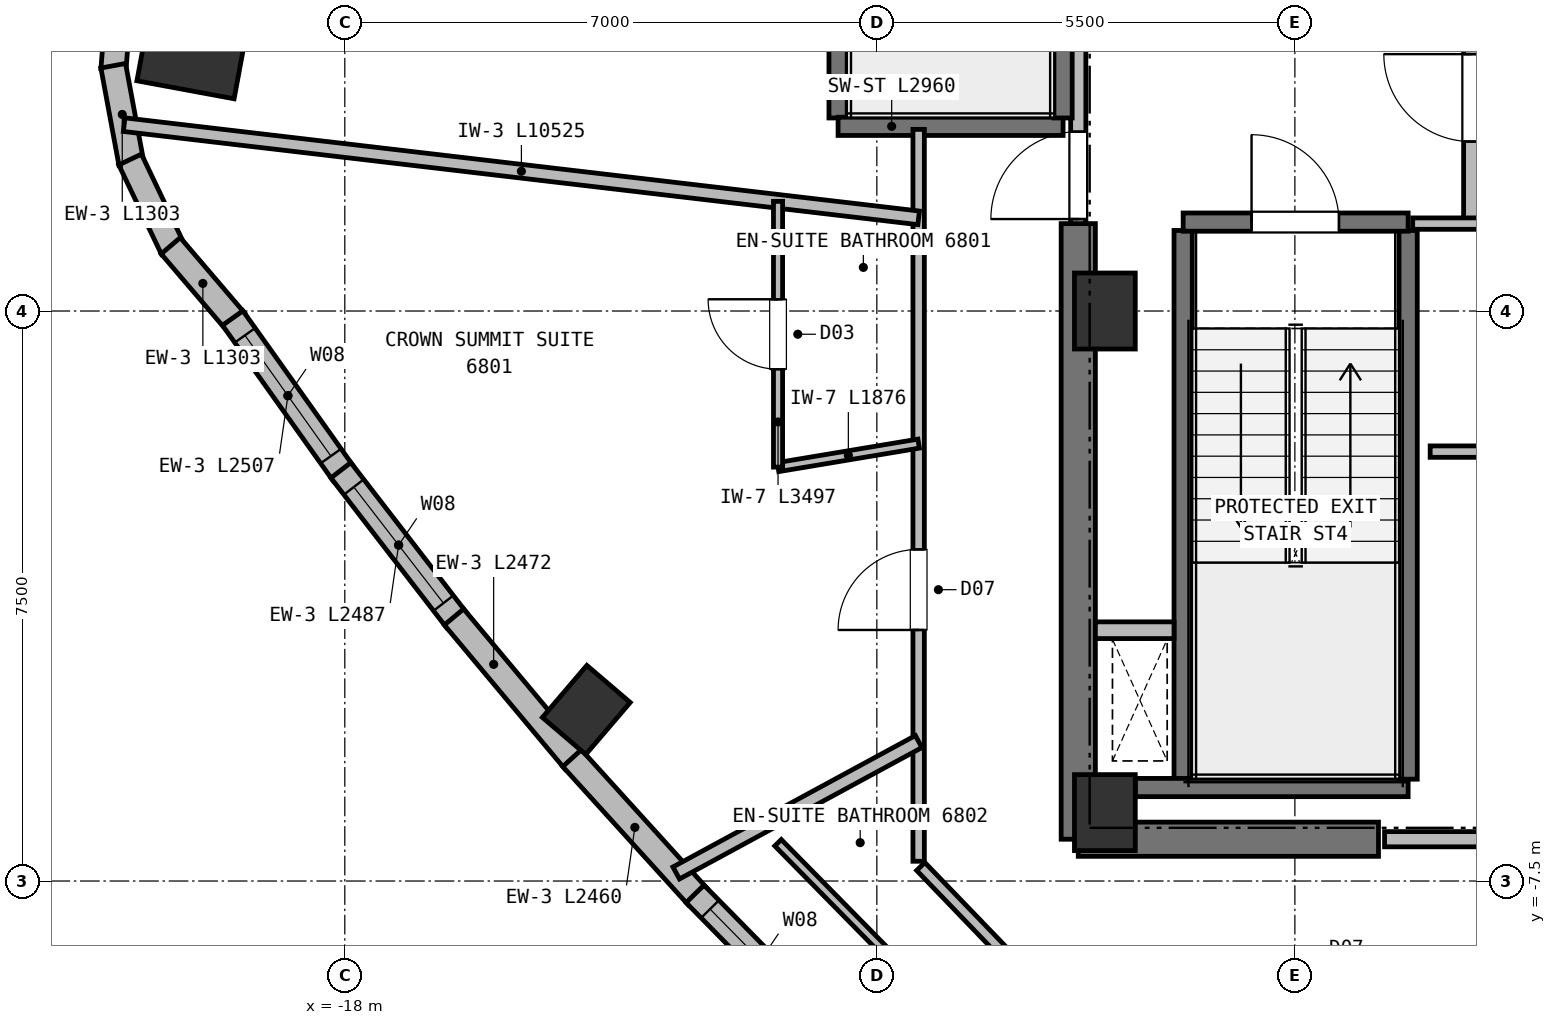
"""IFC4 building model, lengths in metres.
Left out: names, types, materials, properties, quantities, classifications, styles, units other than length and angle.
Written with IfcOpenShell. Run it as: python <this file> out.ifc"""

import sys

from ifc_helpers import new_model, si_unit, direction, frame, frame_2d, origin, origin_2d, place, context, subcontext, project, spatial, rectangle, extrude, element, fill, save


model = new_model("IFC4")
c1 = context("Model", 3, precision=1e-05, world=origin(), true_north=direction((0.0, 1.0)))
c2 = subcontext(c1, "Body", "Model", "MODEL_VIEW")
j1 = project(units=[si_unit("LENGTHUNIT", "METRE"), si_unit("PLANEANGLEUNIT", "RADIAN")], contexts=[c1])
p1 = place(None, origin())
s1 = spatial("IfcSite", under=j1, at=p1, CompositionType="ELEMENT")
p2 = place(p1, origin())
s2 = spatial("IfcBuilding", under=s1, at=p2, CompositionType="ELEMENT")
p3 = place(p2, frame((0.0, 0.0, 260.2)))
s3 = spatial("IfcBuildingStorey", under=s2, at=p3, CompositionType="ELEMENT", Elevation=260.2)
for number, where, z_axis, x_axis in (
    (1, (-8.0, -6.6, 0.0), (0.0, 0.0, 1.0), (1.0, 0.0, 0.0)),
    (2, (-8.0, 0.0, 0.0), (0.0, 0.0, 1.0), (1.0, 0.0, 0.0)),
):
    element("IfcColumn", number, at=place(p3, frame(where, z_axis=z_axis, x_axis=x_axis)), inside=s3, PredefinedType="COLUMN", context=c2, shape_type="SweptSolid", body=[
        extrude(rectangle(XDim=0.8, YDim=1.0, at=origin_2d()), origin(), (0.0, 0.0, 1.0), 4.2),
    ])
p4 = place(p3, frame((-8.35, -6.95, 0.0), z_axis=(0.0, 0.0, 1.0), x_axis=(1.0, 0.0, 0.0)))
e3 = element("IfcWall", 3, at=p4, inside=s3, PredefinedType="SHEAR", context=c2, shape_type="SweptSolid", body=[
    extrude(rectangle(XDim=3.95, YDim=0.45, at=frame_2d((1.975, 0.0))), origin(), (0.0, 0.0, 1.0), 3.95),
])
p5 = place(p3, frame((-8.35, -6.95, 0.0), z_axis=(0.0, 0.0, 1.0), x_axis=(0.0, 1.0, 0.0)))
e4 = element("IfcWall", 4, at=p5, inside=s3, PredefinedType="SHEAR", context=c2, shape_type="SweptSolid", body=[
    extrude(rectangle(XDim=8.1, YDim=0.45, at=frame_2d((4.05, 0.0))), origin(), (0.0, 0.0, 1.0), 3.95),
])
p6 = place(p3, frame((-19.95, 3.698, 0.0), z_axis=(0.0, 0.0, 1.0), x_axis=(-0.983254907564, 0.182235525492, 0.0)))
e5 = element("IfcColumn", 5, at=p6, inside=s3, PredefinedType="COLUMN", context=c2, shape_type="SweptSolid", body=[
    extrude(rectangle(XDim=1.3, YDim=1.6, at=origin_2d()), origin(), (0.0, 0.0, 1.0), 4.2),
])
p7 = place(p3, frame((-14.823, -5.249, 0.0), z_axis=(0.0, 0.0, 1.0), x_axis=(-0.7604059656, 0.64944804833, 0.0)))
e6 = element("IfcColumn", 6, at=p7, inside=s3, PredefinedType="COLUMN", context=c2, shape_type="SweptSolid", body=[
    extrude(rectangle(XDim=0.75, YDim=0.9, at=origin_2d()), origin(), (0.0, 0.0, 1.0), 4.2),
])
p8 = place(p3, frame((-21.044, 3.178, 0.0), z_axis=(0.0, 0.0, 1.0), x_axis=(0.078516255123, 0.996912833542, 0.0)))
e7 = element("IfcWall", 7, at=p8, inside=s3, PredefinedType="SOLIDWALL", context=c2, shape_type="SweptSolid", body=[
    extrude(rectangle(XDim=1.303, YDim=0.33, at=frame_2d((0.651, 0.0))), origin(), (0.0, 0.0, 1.0), 3.95),
])
for number, where, z_axis, x_axis in (
    (8, (-20.809, 1.946, 0.0), (0.0, 0.0, 1.0), (-0.182, 0.983, 0.0)),
    (9, (-20.263, 0.817, 0.0), (0.0, 0.0, 1.0), (-0.431, 0.903, 0.0)),
):
    element("IfcWall", number, at=place(p3, frame(where, z_axis=z_axis, x_axis=x_axis)), inside=s3, PredefinedType="SOLIDWALL", context=c2, shape_type="SweptSolid", body=[
        extrude(rectangle(XDim=1.303, YDim=0.33, at=frame_2d((0.652, 0.0))), origin(), (0.0, 0.0, 1.0), 3.95),
    ])
p9 = place(p3, frame((-19.444, -0.132, 0.0), z_axis=(0.0, 0.0, 1.0), x_axis=(-0.649463279453, 0.760392956728, 0.0)))
e10 = element("IfcWall", 10, at=p9, inside=s3, PredefinedType="SOLIDWALL", context=c2, shape_type="SweptSolid", body=[
    extrude(rectangle(XDim=1.303, YDim=0.33, at=frame_2d((0.651, 0.0))), origin(), (0.0, 0.0, 1.0), 3.95),
])
p10 = place(p3, frame((-18.022, -2.135, 0.0), z_axis=(0.0, 0.0, 1.0), x_axis=(-0.579707768808, 0.814824461331, 0.0)))
e11 = element("IfcWall", 11, at=p10, inside=s3, PredefinedType="SOLIDWALL", context=c2, shape_type="SweptSolid", body=[
    extrude(rectangle(XDim=2.507, YDim=0.33, at=frame_2d((1.253, 0.0))), origin(), (0.0, 0.0, 1.0), 3.95),
])
p11 = place(p10, frame((0.278, 0.0, 0.72)))
e12 = element("IfcOpeningElement", 12, at=p11, cuts=e11, PredefinedType="OPENING", context=c2, shape_type="SweptSolid", body=[
    extrude(rectangle(XDim=1.95, YDim=2.1, at=frame_2d((0.975, 1.05))), frame((0.0, 0.175, 0.0), z_axis=(0.0, -1.0, 0.0), x_axis=(1.0, 0.0, 0.0)), (0.0, 0.0, 1.0), 0.35),
])
p12 = place(p3, frame((-16.532, -4.064, 0.0), z_axis=(0.0, 0.0, 1.0), x_axis=(-0.610966936387, 0.791656113879, 0.0)))
e13 = element("IfcWall", 13, at=p12, inside=s3, PredefinedType="SOLIDWALL", context=c2, shape_type="SweptSolid", body=[
    extrude(rectangle(XDim=2.488, YDim=0.33, at=frame_2d((1.244, 0.0))), origin(), (0.0, 0.0, 1.0), 3.95),
])
p13 = place(p12, frame((0.279, 0.0, 0.72)))
e14 = element("IfcOpeningElement", 14, at=p13, cuts=e13, PredefinedType="OPENING", context=c2, shape_type="SweptSolid", body=[
    extrude(rectangle(XDim=1.93, YDim=2.1, at=frame_2d((0.965, 1.05))), frame((0.0, 0.175, 0.0), z_axis=(0.0, -1.0, 0.0), x_axis=(1.0, 0.0, 0.0)), (0.0, 0.0, 1.0), 0.35),
])
p14 = place(p3, frame((-14.977, -5.921, 0.0), z_axis=(0.0, 0.0, 1.0), x_axis=(-0.641757017805, 0.76690803236, 0.0)))
e15 = element("IfcWall", 15, at=p14, inside=s3, PredefinedType="SOLIDWALL", context=c2, shape_type="SweptSolid", body=[
    extrude(rectangle(XDim=2.472, YDim=0.33, at=frame_2d((1.236, 0.0))), origin(), (0.0, 0.0, 1.0), 3.95),
])
p15 = place(p3, frame((-13.357, -7.705, 0.0), z_axis=(0.0, 0.0, 1.0), x_axis=(-0.671827602416, 0.740707548653, 0.0)))
e16 = element("IfcWall", 16, at=p15, inside=s3, PredefinedType="SOLIDWALL", context=c2, shape_type="SweptSolid", body=[
    extrude(rectangle(XDim=2.46, YDim=0.33, at=frame_2d((1.23, 0.0))), origin(), (0.0, 0.0, 1.0), 3.95),
])
p16 = place(p3, frame((-11.672, -9.417, 0.0), z_axis=(0.0, 0.0, 1.0), x_axis=(-0.701107893647, 0.713055202257, 0.0)))
e17 = element("IfcWall", 17, at=p16, inside=s3, PredefinedType="SOLIDWALL", context=c2, shape_type="SweptSolid", body=[
    extrude(rectangle(XDim=2.452, YDim=0.33, at=frame_2d((1.226, 0.0))), origin(), (0.0, 0.0, 1.0), 3.95),
])
p17 = place(p16, frame((0.281, 0.0, 0.72)))
e18 = element("IfcOpeningElement", 18, at=p17, cuts=e17, PredefinedType="OPENING", context=c2, shape_type="SweptSolid", body=[
    extrude(rectangle(XDim=1.89, YDim=2.1, at=frame_2d((0.945, 1.05))), frame((0.0, 0.175, 0.0), z_axis=(0.0, -1.0, 0.0), x_axis=(1.0, 0.0, 0.0)), (0.0, 0.0, 1.0), 0.35),
])
p18 = place(p3, frame((-6.97, -6.16, 0.0), z_axis=(0.0, 0.0, 1.0), x_axis=(0.0, 1.0, 0.0)))
e19 = element("IfcWall", 19, at=p18, inside=s3, PredefinedType="SHEAR", context=c2, shape_type="SweptSolid", body=[
    extrude(rectangle(XDim=7.22, YDim=0.24, at=frame_2d((3.61, 0.0))), origin(), (0.0, 0.0, 1.0), 3.95),
])
p19 = place(p3, frame((-7.6, -6.27, 0.0), z_axis=(0.0, 0.0, 1.0), x_axis=(1.0, 0.0, 0.0)))
e20 = element("IfcWall", 20, at=p19, inside=s3, PredefinedType="SHEAR", context=c2, shape_type="SweptSolid", body=[
    extrude(rectangle(XDim=3.59, YDim=0.24, at=frame_2d((1.795, 0.0))), origin(), (0.0, 0.0, 1.0), 3.95),
])
p20 = place(p3, frame((-4.01, -6.16, 0.0), z_axis=(0.0, 0.0, 1.0), x_axis=(0.0, 1.0, 0.0)))
e21 = element("IfcWall", 21, at=p20, inside=s3, PredefinedType="SHEAR", context=c2, shape_type="SweptSolid", body=[
    extrude(rectangle(XDim=7.22, YDim=0.24, at=frame_2d((3.61, 0.0))), origin(), (0.0, 0.0, 1.0), 3.95),
])
p21 = place(p3, frame((-6.97, 1.17, 0.0), z_axis=(0.0, 0.0, 1.0), x_axis=(1.0, 0.0, 0.0)))
e22 = element("IfcWall", 22, at=p21, inside=s3, PredefinedType="SHEAR", context=c2, shape_type="SweptSolid", body=[
    extrude(rectangle(XDim=2.96, YDim=0.24, at=frame_2d((1.48, 0.0))), origin(), (0.0, 0.0, 1.0), 3.95),
])
p22 = place(p21, frame((0.9, 0.0, 0.0)))
e23 = element("IfcOpeningElement", 23, at=p22, cuts=e22, PredefinedType="OPENING", context=c2, shape_type="SweptSolid", body=[
    extrude(rectangle(XDim=1.15, YDim=2.15, at=frame_2d((0.575, 1.075))), frame((0.0, 0.13, 0.0), z_axis=(0.0, -1.0, 0.0), x_axis=(1.0, 0.0, 0.0)), (0.0, 0.0, 1.0), 0.26),
])
p23 = place(p3, frame((-8.125, -4.2, 0.0), z_axis=(0.0, 0.0, 1.0), x_axis=(1.0, 0.0, 0.0)))
e24 = element("IfcWall", 24, at=p23, inside=s3, PredefinedType="PARTITIONING", context=c2, shape_type="SweptSolid", body=[
    extrude(rectangle(XDim=1.035, YDim=0.22, at=frame_2d((0.518, 0.0))), origin(), (0.0, 0.0, 1.0), 3.95),
])
p24 = place(p3, frame((-3.18, 1.15, 0.0), z_axis=(0.0, 0.0, 1.0), x_axis=(0.0, 1.0, 0.0)))
e25 = element("IfcWall", 25, at=p24, inside=s3, PredefinedType="PARTITIONING", context=c2, shape_type="SweptSolid", body=[
    extrude(rectangle(XDim=3.3, YDim=0.2, at=frame_2d((1.65, 0.0))), origin(), (0.0, 0.0, 1.0), 3.95),
])
p25 = place(p24, frame((1.08, 0.0, 0.0)))
e26 = element("IfcOpeningElement", 26, at=p25, cuts=e25, PredefinedType="OPENING", context=c2, shape_type="SweptSolid", body=[
    extrude(rectangle(XDim=1.15, YDim=2.15, at=frame_2d((0.575, 1.075))), frame((0.0, 0.11, 0.0), z_axis=(0.0, -1.0, 0.0), x_axis=(1.0, 0.0, 0.0)), (0.0, 0.0, 1.0), 0.22),
])
p26 = place(p3, frame((-8.35, 1.15, 0.0), z_axis=(0.0, 0.0, 1.0), x_axis=(0.0, 1.0, 0.0)))
e27 = element("IfcWall", 27, at=p26, inside=s3, PredefinedType="PARTITIONING", context=c2, shape_type="SweptSolid", body=[
    extrude(rectangle(XDim=5.4, YDim=0.2, at=frame_2d((2.7, 0.0))), origin(), (0.0, 0.0, 1.0), 3.95),
])
p27 = place(p26, frame((0.06, 0.0, 0.0)))
e28 = element("IfcOpeningElement", 28, at=p27, cuts=e27, PredefinedType="OPENING", context=c2, shape_type="SweptSolid", body=[
    extrude(rectangle(XDim=1.15, YDim=2.15, at=frame_2d((0.575, 1.075))), frame((0.0, 0.11, 0.0), z_axis=(0.0, -1.0, 0.0), x_axis=(1.0, 0.0, 0.0)), (0.0, 0.0, 1.0), 0.22),
])
p28 = place(p3, frame((3.95, 1.15, 0.0), z_axis=(0.0, 0.0, 1.0), x_axis=(-1.0, 0.0, 0.0)))
e29 = element("IfcWall", 29, at=p28, inside=s3, PredefinedType="PARTITIONING", context=c2, shape_type="SweptSolid", body=[
    extrude(rectangle(XDim=7.9, YDim=0.15, at=frame_2d((3.95, 0.0))), origin(), (0.0, 0.0, 1.0), 3.95),
])
p29 = place(p28, frame((5.34, 0.0, 0.0)))
e30 = element("IfcOpeningElement", 30, at=p29, cuts=e29, PredefinedType="OPENING", context=c2, shape_type="SweptSolid", body=[
    extrude(rectangle(XDim=0.92, YDim=2.05, at=frame_2d((0.46, 1.025))), frame((0.0, 0.085, 0.0), z_axis=(0.0, -1.0, 0.0), x_axis=(1.0, 0.0, 0.0)), (0.0, 0.0, 1.0), 0.17),
])
p30 = place(p28, frame((1.84, 0.0, 0.0)))
e31 = element("IfcOpeningElement", 31, at=p30, cuts=e29, PredefinedType="OPENING", context=c2, shape_type="SweptSolid", body=[
    extrude(rectangle(XDim=0.92, YDim=2.05, at=frame_2d((0.46, 1.025))), frame((0.0, 0.085, 0.0), z_axis=(0.0, -1.0, 0.0), x_axis=(1.0, 0.0, 0.0)), (0.0, 0.0, 1.0), 0.17),
])
p31 = place(p3, frame((-4.32, -6.95, 0.0), z_axis=(0.0, 0.0, 1.0), x_axis=(1.0, 0.0, 0.0)))
e32 = element("IfcWall", 32, at=p31, inside=s3, PredefinedType="PARTITIONING", context=c2, shape_type="SweptSolid", body=[
    extrude(rectangle(XDim=8.64, YDim=0.2, at=frame_2d((4.32, 0.0))), origin(), (0.0, 0.0, 1.0), 3.95),
])
p32 = place(p3, frame((-3.72, -1.85, 0.0), z_axis=(0.0, 0.0, 1.0), x_axis=(1.0, 0.0, 0.0)))
e33 = element("IfcWall", 33, at=p32, inside=s3, PredefinedType="PARTITIONING", context=c2, shape_type="SweptSolid", body=[
    extrude(rectangle(XDim=7.44, YDim=0.15, at=frame_2d((3.72, 0.0))), origin(), (0.0, 0.0, 1.0), 3.95),
])
p33 = place(p32, frame((1.21, 0.0, 0.0)))
e34 = element("IfcOpeningElement", 34, at=p33, cuts=e33, PredefinedType="OPENING", context=c2, shape_type="SweptSolid", body=[
    extrude(rectangle(XDim=0.92, YDim=2.05, at=frame_2d((0.46, 1.025))), frame((0.0, 0.085, 0.0), z_axis=(0.0, -1.0, 0.0), x_axis=(1.0, 0.0, 0.0)), (0.0, 0.0, 1.0), 0.17),
])
p34 = place(p32, frame((4.91, 0.0, 0.0)))
e35 = element("IfcOpeningElement", 35, at=p34, cuts=e33, PredefinedType="OPENING", context=c2, shape_type="SweptSolid", body=[
    extrude(rectangle(XDim=0.92, YDim=2.05, at=frame_2d((0.46, 1.025))), frame((0.0, 0.085, 0.0), z_axis=(0.0, -1.0, 0.0), x_axis=(1.0, 0.0, 0.0)), (0.0, 0.0, 1.0), 0.17),
])
p35 = place(p3, frame((-11.51, 2.54, 0.0), z_axis=(0.0, 0.0, 1.0), x_axis=(0.0, 1.0, 0.0)))
e36 = element("IfcWall", 36, at=p35, inside=s3, PredefinedType="SHEAR", context=c2, shape_type="SweptSolid", body=[
    extrude(rectangle(XDim=6.42, YDim=0.24, at=frame_2d((3.21, 0.0))), origin(), (0.0, 0.0, 1.0), 3.95),
])
p36 = place(p3, frame((-11.51, 2.43, 0.0), z_axis=(0.0, 0.0, 1.0), x_axis=(1.0, 0.0, 0.0)))
e37 = element("IfcWall", 37, at=p36, inside=s3, PredefinedType="SHEAR", context=c2, shape_type="SweptSolid", body=[
    extrude(rectangle(XDim=2.96, YDim=0.24, at=frame_2d((1.48, 0.0))), origin(), (0.0, 0.0, 1.0), 3.95),
])
p37 = place(p3, frame((-8.55, 2.54, 0.0), z_axis=(0.0, 0.0, 1.0), x_axis=(0.0, 1.0, 0.0)))
e38 = element("IfcWall", 38, at=p37, inside=s3, PredefinedType="SHEAR", context=c2, shape_type="SweptSolid", body=[
    extrude(rectangle(XDim=6.42, YDim=0.24, at=frame_2d((3.21, 0.0))), origin(), (0.0, 0.0, 1.0), 3.95),
])
p38 = place(p3, frame((-10.45, -7.24, 0.0), z_axis=(0.0, 0.0, 1.0), x_axis=(0.0, 1.0, 0.0)))
e39 = element("IfcWall", 39, at=p38, inside=s3, PredefinedType="PARTITIONING", context=c2, shape_type="SweptSolid", body=[
    extrude(rectangle(XDim=9.63, YDim=0.15, at=frame_2d((4.815, 0.0))), origin(), (0.0, 0.0, 1.0), 3.95),
])
p39 = place(p38, frame((3.043, 0.0, 0.0)))
e40 = element("IfcOpeningElement", 40, at=p39, cuts=e39, PredefinedType="OPENING", context=c2, shape_type="SweptSolid", body=[
    extrude(rectangle(XDim=1.06, YDim=2.15, at=frame_2d((0.53, 1.075))), frame((0.0, 0.085, 0.0), z_axis=(0.0, -1.0, 0.0), x_axis=(1.0, 0.0, 0.0)), (0.0, 0.0, 1.0), 0.17),
])
p40 = place(p3, frame((-8.648, -9.151, 0.0), z_axis=(0.0, 0.0, 1.0), x_axis=(-0.693764562202, 0.720201869085, 0.0)))
e41 = element("IfcWall", 41, at=p40, inside=s3, PredefinedType="PARTITIONING", context=c2, shape_type="SweptSolid", body=[
    extrude(rectangle(XDim=2.558, YDim=0.15, at=frame_2d((1.279, 0.0))), origin(), (0.0, 0.0, 1.0), 3.95),
])
p41 = place(p3, frame((-10.45, 1.226, 0.0), z_axis=(0.0, 0.0, 1.0), x_axis=(-0.993188711069, 0.116516883775, 0.0)))
e42 = element("IfcWall", 42, at=p41, inside=s3, PredefinedType="PARTITIONING", context=c2, shape_type="SweptSolid", body=[
    extrude(rectangle(XDim=10.525, YDim=0.18, at=frame_2d((5.262, 0.0))), origin(), (0.0, 0.0, 1.0), 3.95),
])
p42 = place(p3, frame((-12.3, -2.054, 0.0), z_axis=(0.0, 0.0, 1.0), x_axis=(0.986351677294, 0.164652266004, 0.0)))
e43 = element("IfcWall", 43, at=p42, inside=s3, PredefinedType="PARTITIONING", context=c2, shape_type="SweptSolid", body=[
    extrude(rectangle(XDim=1.876, YDim=0.12, at=frame_2d((0.938, 0.0))), origin(), (0.0, 0.0, 1.0), 3.95),
])
p43 = place(p3, frame((-12.3, -2.054, 0.0), z_axis=(0.0, 0.0, 1.0), x_axis=(0.0, 1.0, 0.0)))
e44 = element("IfcWall", 44, at=p43, inside=s3, PredefinedType="PARTITIONING", context=c2, shape_type="SweptSolid", body=[
    extrude(rectangle(XDim=3.497, YDim=0.12, at=frame_2d((1.749, 0.0))), origin(), (0.0, 0.0, 1.0), 3.95),
])
p44 = place(p43, frame((1.288, 0.0, 0.0)))
e45 = element("IfcOpeningElement", 45, at=p44, cuts=e44, PredefinedType="OPENING", context=c2, shape_type="SweptSolid", body=[
    extrude(rectangle(XDim=0.92, YDim=2.1, at=frame_2d((0.46, 1.05))), frame((0.0, 0.07, 0.0), z_axis=(0.0, -1.0, 0.0), x_axis=(1.0, 0.0, 0.0)), (0.0, 0.0, 1.0), 0.14),
])
p45 = place(p3, frame((-10.45, -5.665, 0.0), z_axis=(0.0, 0.0, 1.0), x_axis=(-0.87913221744, -0.476577951922, 0.0)))
e46 = element("IfcWall", 46, at=p45, inside=s3, PredefinedType="PARTITIONING", context=c2, shape_type="SweptSolid", body=[
    extrude(rectangle(XDim=3.628, YDim=0.18, at=frame_2d((1.814, 0.0))), origin(), (0.0, 0.0, 1.0), 3.95),
])
p46 = place(p3, frame((-12.3, -6.996, 0.0), z_axis=(0.0, 0.0, 1.0), x_axis=(0.701139951814, -0.713023679811, 0.0)))
e47 = element("IfcWall", 47, at=p46, inside=s3, PredefinedType="PARTITIONING", context=c2, shape_type="SweptSolid", body=[
    extrude(rectangle(XDim=2.116, YDim=0.12, at=frame_2d((1.058, 0.0))), origin(), (0.0, 0.0, 1.0), 3.95),
])
p47 = place(p11, origin())
e48 = element("IfcWindow", 48, at=p47, inside=s3, PartitioningType="SINGLE_PANEL", PredefinedType="WINDOW", context=c2, shape_type="SweptSolid", body=[
    extrude(rectangle(XDim=1.95, YDim=2.1, at=frame_2d((0.975, 1.05))), frame((0.0, 0.03, 0.0), z_axis=(0.0, -1.0, 0.0), x_axis=(1.0, 0.0, 0.0)), (0.0, 0.0, 1.0), 0.06),
])
fill(e12, e48)
p48 = place(p13, origin())
e49 = element("IfcWindow", 49, at=p48, inside=s3, PartitioningType="SINGLE_PANEL", PredefinedType="WINDOW", context=c2, shape_type="SweptSolid", body=[
    extrude(rectangle(XDim=1.93, YDim=2.1, at=frame_2d((0.965, 1.05))), frame((0.0, 0.03, 0.0), z_axis=(0.0, -1.0, 0.0), x_axis=(1.0, 0.0, 0.0)), (0.0, 0.0, 1.0), 0.06),
])
fill(e14, e49)
p49 = place(p17, origin())
e50 = element("IfcWindow", 50, at=p49, inside=s3, PartitioningType="SINGLE_PANEL", PredefinedType="WINDOW", context=c2, shape_type="SweptSolid", body=[
    extrude(rectangle(XDim=1.89, YDim=2.1, at=frame_2d((0.945, 1.05))), frame((0.0, 0.03, 0.0), z_axis=(0.0, -1.0, 0.0), x_axis=(1.0, 0.0, 0.0)), (0.0, 0.0, 1.0), 0.06),
])
fill(e18, e50)
p50 = place(p22, origin())
e51 = element("IfcDoor", 51, at=p50, inside=s3, OperationType="SINGLE_SWING_LEFT", PredefinedType="DOOR", context=c2, shape_type="SweptSolid", body=[
    extrude(rectangle(XDim=1.15, YDim=2.15, at=frame_2d((0.575, 1.075))), frame((0.0, 0.025, 0.0), z_axis=(0.0, -1.0, 0.0), x_axis=(1.0, 0.0, 0.0)), (0.0, 0.0, 1.0), 0.05),
])
fill(e23, e51)
p51 = place(p25, origin())
e52 = element("IfcDoor", 52, at=p51, inside=s3, OperationType="SINGLE_SWING_RIGHT", PredefinedType="DOOR", context=c2, shape_type="SweptSolid", body=[
    extrude(rectangle(XDim=1.15, YDim=2.15, at=frame_2d((0.575, 1.075))), frame((0.0, 0.025, 0.0), z_axis=(0.0, -1.0, 0.0), x_axis=(1.0, 0.0, 0.0)), (0.0, 0.0, 1.0), 0.05),
])
fill(e26, e52)
p52 = place(p27, origin())
e53 = element("IfcDoor", 53, at=p52, inside=s3, OperationType="SINGLE_SWING_LEFT", PredefinedType="DOOR", context=c2, shape_type="SweptSolid", body=[
    extrude(rectangle(XDim=1.15, YDim=2.15, at=frame_2d((0.575, 1.075))), frame((0.0, 0.025, 0.0), z_axis=(0.0, -1.0, 0.0), x_axis=(1.0, 0.0, 0.0)), (0.0, 0.0, 1.0), 0.05),
])
fill(e28, e53)
p53 = place(p44, origin())
e54 = element("IfcDoor", 54, at=p53, inside=s3, OperationType="SINGLE_SWING_RIGHT", PredefinedType="DOOR", context=c2, shape_type="SweptSolid", body=[
    extrude(rectangle(XDim=0.92, YDim=2.1, at=frame_2d((0.46, 1.05))), frame((0.0, 0.025, 0.0), z_axis=(0.0, -1.0, 0.0), x_axis=(1.0, 0.0, 0.0)), (0.0, 0.0, 1.0), 0.05),
])
fill(e45, e54)
p54 = place(p39, origin())
e55 = element("IfcDoor", 55, at=p54, inside=s3, OperationType="SINGLE_SWING_LEFT", PredefinedType="DOOR", context=c2, shape_type="SweptSolid", body=[
    extrude(rectangle(XDim=1.06, YDim=2.15, at=frame_2d((0.53, 1.075))), frame((0.0, 0.025, 0.0), z_axis=(0.0, -1.0, 0.0), x_axis=(1.0, 0.0, 0.0)), (0.0, 0.0, 1.0), 0.05),
])
fill(e40, e55)
save(model, sys.argv[1])
